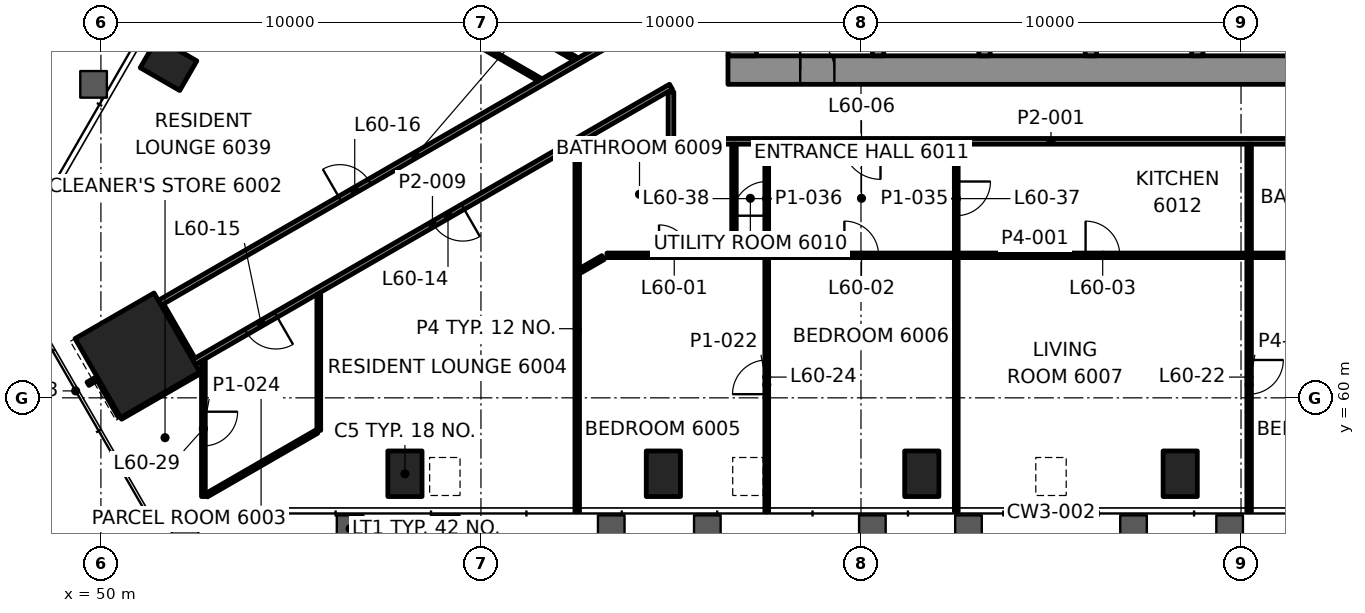
"""IFC4 building model, lengths in metres.
Left out: names, types, materials, properties, quantities, classifications, styles, units other than length and angle.
Written with IfcOpenShell. Run it as: python <this file> out.ifc"""

import sys

from ifc_helpers import new_model, si_unit, direction, frame, frame_2d, origin, origin_2d, place, context, subcontext, project, spatial, rectangle, hollow_rectangle, extrude, element, fill, save


model = new_model("IFC4")
c1 = context("Model", 3, precision=1e-05, world=origin(), true_north=direction((0.0, 1.0)))
c2 = subcontext(c1, "Body", "Model", "MODEL_VIEW")
j1 = project(units=[si_unit("LENGTHUNIT", "METRE"), si_unit("PLANEANGLEUNIT", "RADIAN")], contexts=[c1])
p1 = place(None, origin())
s1 = spatial("IfcSite", under=j1, at=p1, CompositionType="ELEMENT")
p2 = place(p1, origin())
s2 = spatial("IfcBuilding", under=s1, at=p2, CompositionType="ELEMENT")
p3 = place(p2, frame((0.0, 0.0, 256.6)))
s3 = spatial("IfcBuildingStorey", under=s2, at=p3, CompositionType="ELEMENT", Elevation=256.6)
p4 = place(p3, frame((50.959, 61.12, 0.0), z_axis=(0.0, 0.0, 1.0), x_axis=(0.5, -0.866025403784, 0.0)))
e1 = element("IfcColumn", 1, at=p4, inside=s3, PredefinedType="COLUMN", context=c2, shape_type="SweptSolid", body=[
    extrude(rectangle(XDim=2.4, YDim=2.4, at=origin_2d()), origin(), (0.0, 0.0, 1.0), 3.5),
])
for number, where, z_axis, x_axis in (
    (2, (58.0, 58.002, -0.0), (0.0, 0.0, 1.0), (1.0, 0.0, 0.0)),
    (3, (64.8, 58.002, -0.0), (0.0, 0.0, 1.0), (1.0, 0.0, 0.0)),
    (4, (71.6, 58.002, -0.0), (0.0, 0.0, 1.0), (1.0, 0.0, 0.0)),
    (5, (78.4, 58.002, -0.0), (0.0, 0.0, 1.0), (1.0, 0.0, 0.0)),
    (6, (51.78, 68.777, -0.0), (0.0, 0.0, 1.0), (-0.5, -0.866, 0.0)),
):
    element("IfcColumn", number, at=place(p3, frame(where, z_axis=z_axis, x_axis=x_axis)), inside=s3, PredefinedType="COLUMN", context=c2, shape_type="SweptSolid", body=[
        extrude(hollow_rectangle(XDim=0.9, YDim=1.2, WallThickness=0.06, at=origin_2d()), origin(), (0.0, 0.0, 1.0), 3.5),
    ])
p5 = place(p3, frame((66.5, 68.625, 0.0), z_axis=(0.0, 0.0, 1.0), x_axis=(1.0, 0.0, 0.0)))
e7 = element("IfcWall", 7, at=p5, inside=s3, PredefinedType="SHEAR", context=c2, shape_type="SweptSolid", body=[
    extrude(rectangle(XDim=17.0, YDim=0.75, at=frame_2d((8.5, 0.0))), origin(), (0.0, 0.0, 1.0), 3.3),
])
p6 = place(p5, frame((1.9, 0.0, 0.0)))
e8 = element("IfcOpeningElement", 8, at=p6, cuts=e7, PredefinedType="OPENING", context=c2, shape_type="SweptSolid", body=[
    extrude(rectangle(XDim=0.9, YDim=2.1, at=frame_2d((0.45, 1.05))), frame((0.0, 0.385, 0.0), z_axis=(0.0, -1.0, 0.0), x_axis=(1.0, 0.0, 0.0)), (0.0, 0.0, 1.0), 0.77),
])
p7 = place(p3, frame((66.875, 69.0, 0.0), z_axis=(0.0, 0.0, 1.0), x_axis=(0.0, 1.0, 0.0)))
e9 = element("IfcWall", 9, at=p7, inside=s3, PredefinedType="SHEAR", context=c2, shape_type="SweptSolid", body=[
    extrude(rectangle(XDim=12.0, YDim=0.75, at=frame_2d((6.0, 0.0))), origin(), (0.0, 0.0, 1.0), 3.3),
])
p8 = place(p7, frame((3.7, 0.0, 0.0)))
e10 = element("IfcOpeningElement", 10, at=p8, cuts=e9, PredefinedType="OPENING", context=c2, shape_type="SweptSolid", body=[
    extrude(rectangle(XDim=1.2, YDim=2.1, at=frame_2d((0.6, 1.05))), frame((0.0, 0.385, 0.0), z_axis=(0.0, -1.0, 0.0), x_axis=(1.0, 0.0, 0.0)), (0.0, 0.0, 1.0), 0.77),
])
for number, where, z_axis, x_axis in (
    (11, (70.45, 69.0, 0.0), (0.0, 0.0, 1.0), (0.0, 1.0, 0.0)),
    (12, (73.25, 69.0, 0.0), (0.0, 0.0, 1.0), (0.0, 1.0, 0.0)),
    (13, (76.05, 69.0, 0.0), (0.0, 0.0, 1.0), (0.0, 1.0, 0.0)),
    (14, (78.85, 69.0, 0.0), (0.0, 0.0, 1.0), (0.0, 1.0, 0.0)),
):
    element("IfcWall", number, at=place(p3, frame(where, z_axis=z_axis, x_axis=x_axis)), inside=s3, PredefinedType="SHEAR", context=c2, shape_type="SweptSolid", body=[
        extrude(rectangle(XDim=2.6, YDim=0.3, at=frame_2d((1.3, 0.0))), origin(), (0.0, 0.0, 1.0), 3.3),
    ])
p9 = place(p3, frame((63.314, 63.75, 0.0), z_axis=(0.0, 0.0, 1.0), x_axis=(1.0, 0.0, 0.0)))
e15 = element("IfcWall", 15, at=p9, inside=s3, PredefinedType="PARTITIONING", context=c2, shape_type="SweptSolid", body=[
    extrude(rectangle(XDim=23.371, YDim=0.12, at=frame_2d((11.686, 0.0))), origin(), (0.0, 0.0, 1.0), 2.7),
])
p10 = place(p9, frame((1.372, 0.0, 0.0)))
e16 = element("IfcOpeningElement", 16, at=p10, cuts=e15, PredefinedType="OPENING", context=c2, shape_type="SweptSolid", body=[
    extrude(rectangle(XDim=0.8, YDim=2.1, at=frame_2d((0.4, 1.05))), frame((0.0, 0.07, 0.0), z_axis=(0.0, -1.0, 0.0), x_axis=(1.0, 0.0, 0.0)), (0.0, 0.0, 1.0), 0.14),
])
p11 = place(p9, frame((6.249, 0.0, 0.0)))
e17 = element("IfcOpeningElement", 17, at=p11, cuts=e15, PredefinedType="OPENING", context=c2, shape_type="SweptSolid", body=[
    extrude(rectangle(XDim=0.9, YDim=2.1, at=frame_2d((0.45, 1.05))), frame((0.0, 0.07, 0.0), z_axis=(0.0, -1.0, 0.0), x_axis=(1.0, 0.0, 0.0)), (0.0, 0.0, 1.0), 0.14),
])
p12 = place(p9, frame((12.595, 0.0, 0.0)))
e18 = element("IfcOpeningElement", 18, at=p12, cuts=e15, PredefinedType="OPENING", context=c2, shape_type="SweptSolid", body=[
    extrude(rectangle(XDim=0.9, YDim=2.1, at=frame_2d((0.45, 1.05))), frame((0.0, 0.07, 0.0), z_axis=(0.0, -1.0, 0.0), x_axis=(1.0, 0.0, 0.0)), (0.0, 0.0, 1.0), 0.14),
])
p13 = place(p9, frame((18.992, 0.0, 0.0)))
e19 = element("IfcOpeningElement", 19, at=p13, cuts=e15, PredefinedType="OPENING", context=c2, shape_type="SweptSolid", body=[
    extrude(rectangle(XDim=0.8, YDim=2.1, at=frame_2d((0.4, 1.05))), frame((0.0, 0.07, 0.0), z_axis=(0.0, -1.0, 0.0), x_axis=(1.0, 0.0, 0.0)), (0.0, 0.0, 1.0), 0.14),
])
p14 = place(p9, frame((22.078, 0.0, 0.0)))
e20 = element("IfcOpeningElement", 20, at=p14, cuts=e15, PredefinedType="OPENING", context=c2, shape_type="SweptSolid", body=[
    extrude(rectangle(XDim=0.9, YDim=2.1, at=frame_2d((0.45, 1.05))), frame((0.0, 0.07, 0.0), z_axis=(0.0, -1.0, 0.0), x_axis=(1.0, 0.0, 0.0)), (0.0, 0.0, 1.0), 0.14),
])
p15 = place(p3, frame((85.0, 66.75, 0.0), z_axis=(0.0, 0.0, 1.0), x_axis=(-1.0, 0.0, 0.0)))
e21 = element("IfcWall", 21, at=p15, inside=s3, PredefinedType="PARTITIONING", context=c2, shape_type="SweptSolid", body=[
    extrude(rectangle(XDim=20.0, YDim=0.15, at=frame_2d((10.0, 0.0))), origin(), (0.0, 0.0, 1.0), 2.7),
])
p16 = place(p15, frame((14.487, 0.0, 0.0)))
e22 = element("IfcOpeningElement", 22, at=p16, cuts=e21, PredefinedType="OPENING", context=c2, shape_type="SweptSolid", body=[
    extrude(rectangle(XDim=1.0, YDim=2.1, at=frame_2d((0.5, 1.05))), frame((0.0, 0.085, 0.0), z_axis=(0.0, -1.0, 0.0), x_axis=(1.0, 0.0, 0.0)), (0.0, 0.0, 1.0), 0.17),
])
p17 = place(p3, frame((52.779, 57.437, 0.0), z_axis=(0.0, 0.0, 1.0), x_axis=(0.866038859646, 0.49997669304, 0.0)))
e23 = element("IfcWall", 23, at=p17, inside=s3, PredefinedType="PARTITIONING", context=c2, shape_type="SweptSolid", body=[
    extrude(rectangle(XDim=3.353, YDim=0.1, at=frame_2d((1.676, 0.0))), origin(), (0.0, 0.0, 1.0), 2.7),
])
p18 = place(p3, frame((62.628, 63.354, 0.0), z_axis=(0.0, 0.0, 1.0), x_axis=(0.865955892764, 0.500120377296, 0.0)))
e24 = element("IfcWall", 24, at=p18, inside=s3, PredefinedType="PARTITIONING", context=c2, shape_type="SweptSolid", body=[
    extrude(rectangle(XDim=0.673, YDim=0.12, at=frame_2d((0.336, 0.0))), origin(), (0.0, 0.0, 1.0), 2.7),
])
p19 = place(p3, frame((50.52, 59.481, 0.0), z_axis=(0.0, 0.0, 1.0), x_axis=(0.866036455013, 0.499980858223, 0.0)))
e25 = element("IfcWall", 25, at=p19, inside=s3, PredefinedType="PARTITIONING", context=c2, shape_type="SweptSolid", body=[
    extrude(rectangle(XDim=2.399, YDim=0.1, at=frame_2d((1.199, 0.0))), origin(), (0.0, 0.0, 1.0), 2.7),
])
p20 = place(p3, frame((65.0, 68.187, 0.0), z_axis=(0.0, 0.0, 1.0), x_axis=(-0.866027660432, -0.499996091351, 0.0)))
e26 = element("IfcWall", 26, at=p20, inside=s3, PredefinedType="PARTITIONING", context=c2, shape_type="SweptSolid", body=[
    extrude(rectangle(XDim=14.494, YDim=0.15, at=frame_2d((7.247, 0.0))), origin(), (0.0, 0.0, 1.0), 2.547),
])
p21 = place(p20, frame((6.324, 0.0, 0.0)))
e27 = element("IfcOpeningElement", 27, at=p21, cuts=e26, PredefinedType="OPENING", context=c2, shape_type="SweptSolid", body=[
    extrude(rectangle(XDim=0.9, YDim=2.1, at=frame_2d((0.45, 1.05))), frame((0.0, 0.085, 0.0), z_axis=(0.0, -1.0, 0.0), x_axis=(1.0, 0.0, 0.0)), (0.0, 0.0, 1.0), 0.17),
])
p22 = place(p20, frame((12.004, 0.0, 0.0)))
e28 = element("IfcOpeningElement", 28, at=p22, cuts=e26, PredefinedType="OPENING", context=c2, shape_type="SweptSolid", body=[
    extrude(rectangle(XDim=0.9, YDim=2.1, at=frame_2d((0.45, 1.05))), frame((0.0, 0.085, 0.0), z_axis=(0.0, -1.0, 0.0), x_axis=(1.0, 0.0, 0.0)), (0.0, 0.0, 1.0), 0.17),
])
p23 = place(p3, frame((49.66, 60.37, 0.0), z_axis=(0.0, 0.0, 1.0), x_axis=(0.866006330792, 0.500033033937, 0.0)))
e29 = element("IfcWall", 29, at=p23, inside=s3, PredefinedType="PARTITIONING", context=c2, shape_type="SweptSolid", body=[
    extrude(rectangle(XDim=0.25, YDim=0.1, at=frame_2d((0.125, 0.0))), origin(), (0.0, 0.0, 1.0), 2.7),
])
p24 = place(p3, frame((51.549, 62.5, 0.0), z_axis=(0.0, 0.0, 1.0), x_axis=(0.866020420161, 0.50000863179, 0.0)))
e30 = element("IfcWall", 30, at=p24, inside=s3, PredefinedType="PARTITIONING", context=c2, shape_type="SweptSolid", body=[
    extrude(rectangle(XDim=15.532, YDim=0.15, at=frame_2d((7.766, 0.0))), origin(), (0.0, 0.0, 1.0), 2.7),
])
p25 = place(p24, frame((5.474, 0.0, 0.0)))
e31 = element("IfcOpeningElement", 31, at=p25, cuts=e30, PredefinedType="OPENING", context=c2, shape_type="SweptSolid", body=[
    extrude(rectangle(XDim=0.9, YDim=2.1, at=frame_2d((0.45, 1.05))), frame((0.0, 0.085, 0.0), z_axis=(0.0, -1.0, 0.0), x_axis=(1.0, 0.0, 0.0)), (0.0, 0.0, 1.0), 0.17),
])
p26 = place(p3, frame((80.213, 63.69, 0.0), z_axis=(0.0, 0.0, 1.0), x_axis=(0.0, -1.0, 0.0)))
e32 = element("IfcWall", 32, at=p26, inside=s3, PredefinedType="PARTITIONING", context=c2, shape_type="SweptSolid", body=[
    extrude(rectangle(XDim=6.688, YDim=0.12, at=frame_2d((3.344, 0.0))), origin(), (0.0, 0.0, 1.0), 2.688),
])
p27 = place(p26, frame((2.694, 0.0, 0.0)))
e33 = element("IfcOpeningElement", 33, at=p27, cuts=e32, PredefinedType="OPENING", context=c2, shape_type="SweptSolid", body=[
    extrude(rectangle(XDim=0.9, YDim=2.1, at=frame_2d((0.45, 1.05))), frame((0.0, 0.07, 0.0), z_axis=(0.0, -1.0, 0.0), x_axis=(1.0, 0.0, 0.0)), (0.0, 0.0, 1.0), 0.14),
])
p28 = place(p3, frame((72.507, 57.002, 0.0), z_axis=(0.0, 0.0, 1.0), x_axis=(0.0, 1.0, 0.0)))
e34 = element("IfcWall", 34, at=p28, inside=s3, PredefinedType="PARTITIONING", context=c2, shape_type="SweptSolid", body=[
    extrude(rectangle(XDim=6.688, YDim=0.1, at=frame_2d((3.344, 0.0))), origin(), (0.0, 0.0, 1.0), 2.688),
])
p29 = place(p3, frame((67.52, 57.002, 0.0), z_axis=(0.0, 0.0, 1.0), x_axis=(0.0, 1.0, 0.0)))
e35 = element("IfcWall", 35, at=p29, inside=s3, PredefinedType="PARTITIONING", context=c2, shape_type="SweptSolid", body=[
    extrude(rectangle(XDim=6.688, YDim=0.1, at=frame_2d((3.344, 0.0))), origin(), (0.0, 0.0, 1.0), 2.688),
])
p30 = place(p29, frame((3.094, 0.0, 0.0)))
e36 = element("IfcOpeningElement", 36, at=p30, cuts=e35, PredefinedType="OPENING", context=c2, shape_type="SweptSolid", body=[
    extrude(rectangle(XDim=0.9, YDim=2.1, at=frame_2d((0.45, 1.05))), frame((0.0, 0.06, 0.0), z_axis=(0.0, -1.0, 0.0), x_axis=(1.0, 0.0, 0.0)), (0.0, 0.0, 1.0), 0.12),
])
p31 = place(p3, frame((66.658, 63.81, 0.0), z_axis=(0.0, 0.0, 1.0), x_axis=(0.0, 1.0, 0.0)))
e37 = element("IfcWall", 37, at=p31, inside=s3, PredefinedType="PARTITIONING", context=c2, shape_type="SweptSolid", body=[
    extrude(rectangle(XDim=2.865, YDim=0.12, at=frame_2d((1.433, 0.0))), origin(), (0.0, 0.0, 1.0), 2.7),
])
p32 = place(p3, frame((65.0, 66.825, 0.0), z_axis=(0.0, 0.0, 1.0), x_axis=(0.0, 1.0, 0.0)))
e38 = element("IfcWall", 38, at=p32, inside=s3, PredefinedType="PARTITIONING", context=c2, shape_type="SweptSolid", body=[
    extrude(rectangle(XDim=1.226, YDim=0.15, at=frame_2d((0.613, 0.0))), origin(), (0.0, 0.0, 1.0), 2.547),
])
p33 = place(p3, frame((62.533, 57.002, 0.0), z_axis=(0.0, 0.0, 1.0), x_axis=(0.0, 1.0, 0.0)))
e39 = element("IfcWall", 39, at=p33, inside=s3, PredefinedType="PARTITIONING", context=c2, shape_type="SweptSolid", body=[
    extrude(rectangle(XDim=9.634, YDim=0.12, at=frame_2d((4.817, 0.0))), origin(), (0.0, 0.0, 1.0), 2.547),
])
p34 = place(p3, frame((55.733, 59.142, 0.0), z_axis=(0.0, 0.0, 1.0), x_axis=(0.0, 1.0, 0.0)))
e40 = element("IfcWall", 40, at=p34, inside=s3, PredefinedType="PARTITIONING", context=c2, shape_type="SweptSolid", body=[
    extrude(rectangle(XDim=3.578, YDim=0.1, at=frame_2d((1.789, 0.0))), origin(), (0.0, 0.0, 1.0), 2.7),
])
p35 = place(p3, frame((52.697, 60.967, 0.0), z_axis=(0.0, 0.0, 1.0), x_axis=(0.0, -1.0, 0.0)))
e41 = element("IfcWall", 41, at=p35, inside=s3, PredefinedType="PARTITIONING", context=c2, shape_type="SweptSolid", body=[
    extrude(rectangle(XDim=3.565, YDim=0.1, at=frame_2d((1.783, 0.0))), origin(), (0.0, 0.0, 1.0), 2.7),
])
p36 = place(p35, frame((1.333, 0.0, 0.0)))
e42 = element("IfcOpeningElement", 42, at=p36, cuts=e41, PredefinedType="OPENING", context=c2, shape_type="SweptSolid", body=[
    extrude(rectangle(XDim=0.9, YDim=2.1, at=frame_2d((0.45, 1.05))), frame((0.0, 0.06, 0.0), z_axis=(0.0, -1.0, 0.0), x_axis=(1.0, 0.0, 0.0)), (0.0, 0.0, 1.0), 0.12),
])
p37 = place(p3, frame((52.408, 61.01, 0.0), z_axis=(0.0, 0.0, 1.0), x_axis=(-0.499988108725, 0.866032269107, 0.0)))
e43 = element("IfcWall", 43, at=p37, inside=s3, PredefinedType="PARTITIONING", context=c2, shape_type="SweptSolid", body=[
    extrude(rectangle(XDim=1.644, YDim=0.15, at=frame_2d((0.822, 0.0))), origin(), (0.0, 0.0, 1.0), 2.547),
])
p38 = place(p3, frame((50.495, 59.525, 0.0), z_axis=(0.0, 0.0, 1.0), x_axis=(-0.50004744102, 0.865998011966, 0.0)))
e44 = element("IfcWall", 44, at=p38, inside=s3, PredefinedType="PARTITIONING", context=c2, shape_type="SweptSolid", body=[
    extrude(rectangle(XDim=1.149, YDim=0.1, at=frame_2d((0.574, 0.0))), origin(), (0.0, 0.0, 1.0), 2.7),
])
p39 = place(p3, frame((62.469, 68.931, 0.0), z_axis=(0.0, 0.0, 1.0), x_axis=(-0.866033317326, 0.499986293093, 0.0)))
e45 = element("IfcWall", 45, at=p39, inside=s3, PredefinedType="PARTITIONING", context=c2, shape_type="SweptSolid", body=[
    extrude(rectangle(XDim=3.337, YDim=0.12, at=frame_2d((1.669, 0.0))), origin(), (0.0, 0.0, 1.0), 2.7),
])
p40 = place(p3, frame((61.532, 68.38, 0.0), z_axis=(0.0, 0.0, 1.0), x_axis=(-0.866022444854, 0.500005124982, 0.0)))
e46 = element("IfcWall", 46, at=p40, inside=s3, PredefinedType="PARTITIONING", context=c2, shape_type="SweptSolid", body=[
    extrude(rectangle(XDim=9.645, YDim=0.1, at=frame_2d((4.822, 0.0))), origin(), (0.0, 0.0, 1.0), 2.7),
])
p41 = place(p3, frame((80.213, 63.81, 0.0), z_axis=(0.0, 0.0, 1.0), x_axis=(0.0, 1.0, 0.0)))
e47 = element("IfcWall", 47, at=p41, inside=s3, PredefinedType="PARTITIONING", context=c2, shape_type="SweptSolid", body=[
    extrude(rectangle(XDim=2.865, YDim=0.12, at=frame_2d((1.433, 0.0))), origin(), (0.0, 0.0, 1.0), 2.7),
])
p42 = place(p3, frame((72.507, 66.675, 0.0), z_axis=(0.0, 0.0, 1.0), x_axis=(0.0, -1.0, 0.0)))
e48 = element("IfcWall", 48, at=p42, inside=s3, PredefinedType="PARTITIONING", context=c2, shape_type="SweptSolid", body=[
    extrude(rectangle(XDim=2.865, YDim=0.1, at=frame_2d((1.433, 0.0))), origin(), (0.0, 0.0, 1.0), 2.7),
])
p43 = place(p42, frame((0.982, 0.0, 0.0)))
e49 = element("IfcOpeningElement", 49, at=p43, cuts=e48, PredefinedType="OPENING", context=c2, shape_type="SweptSolid", body=[
    extrude(rectangle(XDim=0.9, YDim=2.1, at=frame_2d((0.45, 1.05))), frame((0.0, 0.06, 0.0), z_axis=(0.0, -1.0, 0.0), x_axis=(1.0, 0.0, 0.0)), (0.0, 0.0, 1.0), 0.12),
])
p44 = place(p3, frame((67.52, 63.81, 0.0), z_axis=(0.0, 0.0, 1.0), x_axis=(0.0, 1.0, 0.0)))
e50 = element("IfcWall", 50, at=p44, inside=s3, PredefinedType="PARTITIONING", context=c2, shape_type="SweptSolid", body=[
    extrude(rectangle(XDim=2.865, YDim=0.1, at=frame_2d((1.433, 0.0))), origin(), (0.0, 0.0, 1.0), 2.7),
])
p45 = place(p44, frame((0.982, 0.0, 0.0)))
e51 = element("IfcOpeningElement", 51, at=p45, cuts=e50, PredefinedType="OPENING", context=c2, shape_type="SweptSolid", body=[
    extrude(rectangle(XDim=0.9, YDim=2.1, at=frame_2d((0.45, 1.05))), frame((0.0, 0.06, 0.0), z_axis=(0.0, -1.0, 0.0), x_axis=(1.0, 0.0, 0.0)), (0.0, 0.0, 1.0), 0.12),
])
p46 = place(p10, origin())
e52 = element("IfcDoor", 52, at=p46, inside=s3, OperationType="SINGLE_SWING_RIGHT", PredefinedType="DOOR", context=c2, shape_type="SweptSolid", body=[
    extrude(rectangle(XDim=0.8, YDim=2.1, at=frame_2d((0.4, 1.05))), frame((0.0, 0.025, 0.0), z_axis=(0.0, -1.0, 0.0), x_axis=(1.0, 0.0, 0.0)), (0.0, 0.0, 1.0), 0.05),
])
fill(e16, e52)
p47 = place(p11, origin())
e53 = element("IfcDoor", 53, at=p47, inside=s3, OperationType="SINGLE_SWING_LEFT", PredefinedType="DOOR", context=c2, shape_type="SweptSolid", body=[
    extrude(rectangle(XDim=0.9, YDim=2.1, at=frame_2d((0.45, 1.05))), frame((0.0, 0.025, 0.0), z_axis=(0.0, -1.0, 0.0), x_axis=(1.0, 0.0, 0.0)), (0.0, 0.0, 1.0), 0.05),
])
fill(e17, e53)
p48 = place(p12, origin())
e54 = element("IfcDoor", 54, at=p48, inside=s3, OperationType="SINGLE_SWING_RIGHT", PredefinedType="DOOR", context=c2, shape_type="SweptSolid", body=[
    extrude(rectangle(XDim=0.9, YDim=2.1, at=frame_2d((0.45, 1.05))), frame((0.0, 0.025, 0.0), z_axis=(0.0, -1.0, 0.0), x_axis=(1.0, 0.0, 0.0)), (0.0, 0.0, 1.0), 0.05),
])
fill(e18, e54)
p49 = place(p16, origin())
e55 = element("IfcDoor", 55, at=p49, inside=s3, OperationType="SINGLE_SWING_LEFT", PredefinedType="DOOR", context=c2, shape_type="SweptSolid", body=[
    extrude(rectangle(XDim=1.0, YDim=2.1, at=frame_2d((0.5, 1.05))), frame((0.0, 0.025, 0.0), z_axis=(0.0, -1.0, 0.0), x_axis=(1.0, 0.0, 0.0)), (0.0, 0.0, 1.0), 0.05),
])
fill(e22, e55)
p50 = place(p21, origin())
e56 = element("IfcDoor", 56, at=p50, inside=s3, OperationType="SINGLE_SWING_RIGHT", PredefinedType="DOOR", context=c2, shape_type="SweptSolid", body=[
    extrude(rectangle(XDim=0.9, YDim=2.1, at=frame_2d((0.45, 1.05))), frame((0.0, 0.025, 0.0), z_axis=(0.0, -1.0, 0.0), x_axis=(1.0, 0.0, 0.0)), (0.0, 0.0, 1.0), 0.05),
])
fill(e27, e56)
p51 = place(p22, origin())
e57 = element("IfcDoor", 57, at=p51, inside=s3, OperationType="SINGLE_SWING_LEFT", PredefinedType="DOOR", context=c2, shape_type="SweptSolid", body=[
    extrude(rectangle(XDim=0.9, YDim=2.1, at=frame_2d((0.45, 1.05))), frame((0.0, 0.025, 0.0), z_axis=(0.0, -1.0, 0.0), x_axis=(1.0, 0.0, 0.0)), (0.0, 0.0, 1.0), 0.05),
])
fill(e28, e57)
p52 = place(p25, origin())
e58 = element("IfcDoor", 58, at=p52, inside=s3, OperationType="SINGLE_SWING_RIGHT", PredefinedType="DOOR", context=c2, shape_type="SweptSolid", body=[
    extrude(rectangle(XDim=0.9, YDim=2.1, at=frame_2d((0.45, 1.05))), frame((0.0, 0.025, 0.0), z_axis=(0.0, -1.0, 0.0), x_axis=(1.0, 0.0, 0.0)), (0.0, 0.0, 1.0), 0.05),
])
fill(e31, e58)
p53 = place(p27, origin())
e59 = element("IfcDoor", 59, at=p53, inside=s3, OperationType="SINGLE_SWING_LEFT", PredefinedType="DOOR", context=c2, shape_type="SweptSolid", body=[
    extrude(rectangle(XDim=0.9, YDim=2.1, at=frame_2d((0.45, 1.05))), frame((0.0, 0.025, 0.0), z_axis=(0.0, -1.0, 0.0), x_axis=(1.0, 0.0, 0.0)), (0.0, 0.0, 1.0), 0.05),
])
fill(e33, e59)
p54 = place(p30, origin())
e60 = element("IfcDoor", 60, at=p54, inside=s3, OperationType="SINGLE_SWING_LEFT", PredefinedType="DOOR", context=c2, shape_type="SweptSolid", body=[
    extrude(rectangle(XDim=0.9, YDim=2.1, at=frame_2d((0.45, 1.05))), frame((0.0, 0.025, 0.0), z_axis=(0.0, -1.0, 0.0), x_axis=(1.0, 0.0, 0.0)), (0.0, 0.0, 1.0), 0.05),
])
fill(e36, e60)
p55 = place(p36, origin())
e61 = element("IfcDoor", 61, at=p55, inside=s3, OperationType="SINGLE_SWING_RIGHT", PredefinedType="DOOR", context=c2, shape_type="SweptSolid", body=[
    extrude(rectangle(XDim=0.9, YDim=2.1, at=frame_2d((0.45, 1.05))), frame((0.0, 0.025, 0.0), z_axis=(0.0, -1.0, 0.0), x_axis=(1.0, 0.0, 0.0)), (0.0, 0.0, 1.0), 0.05),
])
fill(e42, e61)
p56 = place(p43, origin())
e62 = element("IfcDoor", 62, at=p56, inside=s3, OperationType="SINGLE_SWING_LEFT", PredefinedType="DOOR", context=c2, shape_type="SweptSolid", body=[
    extrude(rectangle(XDim=0.9, YDim=2.1, at=frame_2d((0.45, 1.05))), frame((0.0, 0.025, 0.0), z_axis=(0.0, -1.0, 0.0), x_axis=(1.0, 0.0, 0.0)), (0.0, 0.0, 1.0), 0.05),
])
fill(e49, e62)
p57 = place(p45, origin())
e63 = element("IfcDoor", 63, at=p57, inside=s3, OperationType="SINGLE_SWING_LEFT", PredefinedType="DOOR", context=c2, shape_type="SweptSolid", body=[
    extrude(rectangle(XDim=0.9, YDim=2.1, at=frame_2d((0.45, 1.05))), frame((0.0, 0.025, 0.0), z_axis=(0.0, -1.0, 0.0), x_axis=(1.0, 0.0, 0.0)), (0.0, 0.0, 1.0), 0.05),
])
fill(e51, e63)
p58 = place(p6, origin())
e64 = element("IfcDoor", 64, at=p58, inside=s3, OperationType="SINGLE_SWING_RIGHT", PredefinedType="DOOR", context=c2, shape_type="SweptSolid", body=[
    extrude(rectangle(XDim=0.9, YDim=2.1, at=frame_2d((0.45, 1.05))), frame((0.0, 0.095, 0.0), z_axis=(0.0, -1.0, 0.0), x_axis=(1.0, 0.0, 0.0)), (0.0, 0.0, 1.0), 0.19),
])
fill(e8, e64)
save(model, sys.argv[1])
